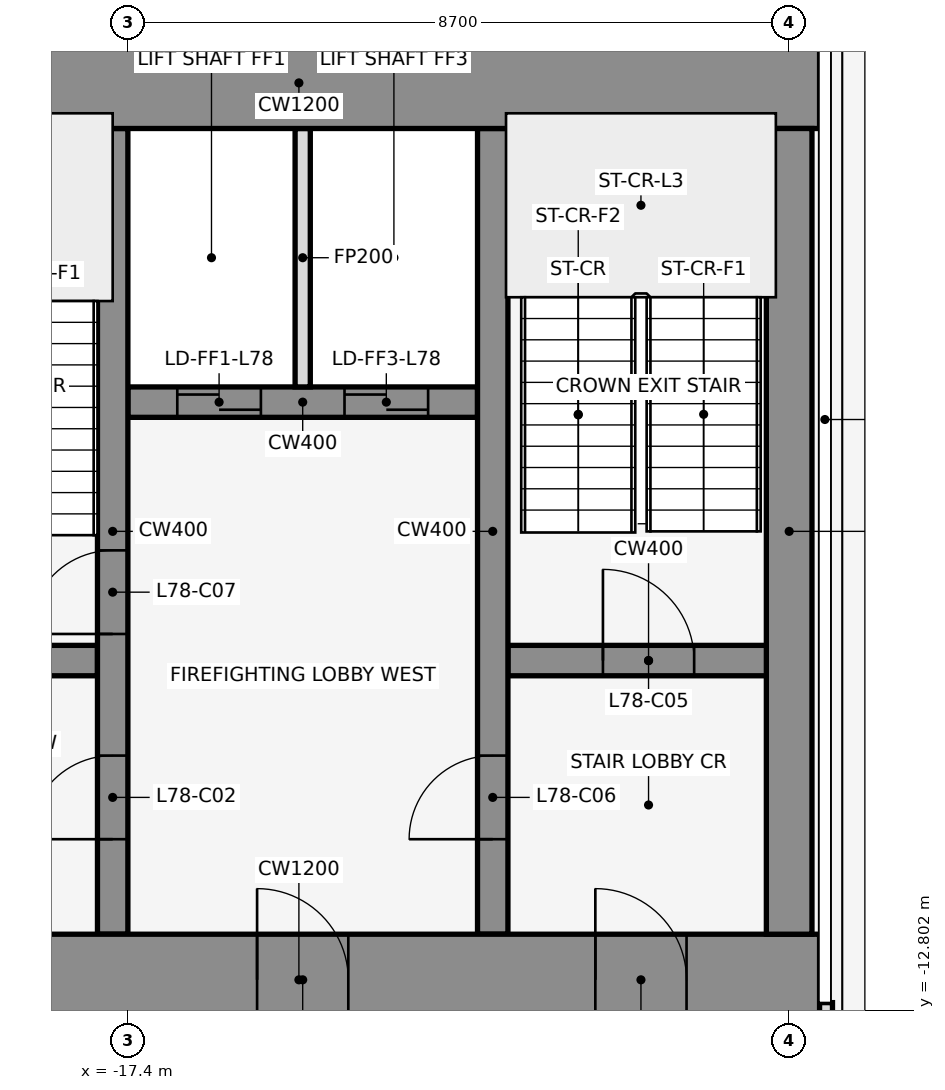
"""IFC4 building model, lengths in metres.
Left out: names, types, materials, properties, quantities, classifications, styles, units other than length and angle.
Written with IfcOpenShell. Run it as: python <this file> out.ifc"""

import sys

from ifc_helpers import new_model, si_unit, direction, frame, frame_2d, origin, place, context, subcontext, project, spatial, rectangle, extrude, element, fill, save


model = new_model("IFC4")
c1 = context("Model", 3, precision=1e-05, world=origin(), true_north=direction((0.0, 1.0)))
c2 = subcontext(c1, "Body", "Model", "MODEL_VIEW")
j1 = project(units=[si_unit("LENGTHUNIT", "METRE"), si_unit("PLANEANGLEUNIT", "RADIAN")], contexts=[c1])
p1 = place(None, origin())
s1 = spatial("IfcSite", under=j1, at=p1, CompositionType="ELEMENT")
p2 = place(p1, origin())
s2 = spatial("IfcBuilding", under=s1, at=p2, CompositionType="ELEMENT")
p3 = place(p2, frame((0.0, 0.0, 347.9)))
s3 = spatial("IfcBuildingStorey", under=s2, at=p3, CompositionType="ELEMENT", Elevation=347.9)
p4 = place(p3, frame((-8.23, -12.7, 0.0), z_axis=(0.0, 0.0, 1.0), x_axis=(0.0, -1.0, 0.0)))
e1 = element("IfcWall", 1, at=p4, inside=s3, PredefinedType="STANDARD", context=c2, shape_type="SweptSolid", body=[
    extrude(rectangle(XDim=3.0, YDim=0.2, at=frame_2d((1.5, 0.0))), origin(), (0.0, 0.0, 1.0), 4.3),
])
p5 = place(p4, frame((0.6, 0.0, 0.0)))
e2 = element("IfcOpeningElement", 2, at=p5, cuts=e1, PredefinedType="OPENING", context=c2, shape_type="SweptSolid", body=[
    extrude(rectangle(XDim=1.8, YDim=2.4, at=frame_2d((0.9, 1.2))), frame((0.0, 0.112, 0.0), z_axis=(0.0, -1.0, 0.0), x_axis=(1.0, 0.0, 0.0)), (0.0, 0.0, 1.0), 0.224),
])
p6 = place(p3, frame((-20.8, -8.2, 0.0), z_axis=(0.0, 0.0, 1.0), x_axis=(1.0, 0.0, 0.0)))
e3 = element("IfcWall", 3, at=p6, inside=s3, PredefinedType="SHEAR", context=c2, shape_type="SweptSolid", body=[
    extrude(rectangle(XDim=3.0, YDim=0.4, at=frame_2d((1.5, 0.0))), origin(), (0.0, 0.0, 1.0), 4.5),
])
p7 = place(p6, frame((0.85, 0.0, 0.0)))
e4 = element("IfcOpeningElement", 4, at=p7, cuts=e3, PredefinedType="OPENING", context=c2, shape_type="SweptSolid", body=[
    extrude(rectangle(XDim=1.2, YDim=2.1, at=frame_2d((0.6, 1.05))), frame((0.0, 0.212, 0.0), z_axis=(0.0, -1.0, 0.0), x_axis=(1.0, 0.0, 0.0)), (0.0, 0.0, 1.0), 0.424),
])
p8 = place(p3, frame((-12.4, -8.2, 0.0), z_axis=(0.0, 0.0, 1.0), x_axis=(1.0, 0.0, 0.0)))
e5 = element("IfcWall", 5, at=p8, inside=s3, PredefinedType="SHEAR", context=c2, shape_type="SweptSolid", body=[
    extrude(rectangle(XDim=3.7, YDim=0.4, at=frame_2d((1.85, 0.0))), origin(), (0.0, 0.0, 1.0), 4.5),
])
p9 = place(p8, frame((1.25, 0.0, 0.0)))
e6 = element("IfcOpeningElement", 6, at=p9, cuts=e5, PredefinedType="OPENING", context=c2, shape_type="SweptSolid", body=[
    extrude(rectangle(XDim=1.2, YDim=2.1, at=frame_2d((0.6, 1.05))), frame((0.0, 0.212, 0.0), z_axis=(0.0, -1.0, 0.0), x_axis=(1.0, 0.0, 0.0)), (0.0, 0.0, 1.0), 0.424),
])
p10 = place(p3, frame((-17.4, -4.8, 0.0), z_axis=(0.0, 0.0, 1.0), x_axis=(1.0, 0.0, 0.0)))
e7 = element("IfcWall", 7, at=p10, inside=s3, PredefinedType="SHEAR", context=c2, shape_type="SweptSolid", body=[
    extrude(rectangle(XDim=4.6, YDim=0.4, at=frame_2d((2.3, 0.0))), origin(), (0.0, 0.0, 1.0), 4.5),
])
p11 = place(p10, frame((0.65, 0.0, 0.0)))
e8 = element("IfcOpeningElement", 8, at=p11, cuts=e7, PredefinedType="OPENING", context=c2, shape_type="SweptSolid", body=[
    extrude(rectangle(XDim=1.1, YDim=2.1, at=frame_2d((0.55, 1.05))), frame((0.0, 0.212, 0.0), z_axis=(0.0, -1.0, 0.0), x_axis=(1.0, 0.0, 0.0)), (0.0, 0.0, 1.0), 0.424),
])
p12 = place(p10, frame((2.85, 0.0, 0.0)))
e9 = element("IfcOpeningElement", 9, at=p12, cuts=e7, PredefinedType="OPENING", context=c2, shape_type="SweptSolid", body=[
    extrude(rectangle(XDim=1.1, YDim=2.1, at=frame_2d((0.55, 1.05))), frame((0.0, 0.212, 0.0), z_axis=(0.0, -1.0, 0.0), x_axis=(1.0, 0.0, 0.0)), (0.0, 0.0, 1.0), 0.424),
])
p13 = place(p3, frame((-17.6, -11.8, 0.0), z_axis=(0.0, 0.0, 1.0), x_axis=(0.0, 1.0, 0.0)))
e10 = element("IfcWall", 10, at=p13, inside=s3, PredefinedType="SHEAR", context=c2, shape_type="SweptSolid", body=[
    extrude(rectangle(XDim=10.6, YDim=0.4, at=frame_2d((5.3, 0.0))), origin(), (0.0, 0.0, 1.0), 4.5),
])
p14 = place(p13, frame((1.25, 0.0, 0.0)))
e11 = element("IfcOpeningElement", 11, at=p14, cuts=e10, PredefinedType="OPENING", context=c2, shape_type="SweptSolid", body=[
    extrude(rectangle(XDim=1.1, YDim=2.1, at=frame_2d((0.55, 1.05))), frame((0.0, 0.212, 0.0), z_axis=(0.0, -1.0, 0.0), x_axis=(1.0, 0.0, 0.0)), (0.0, 0.0, 1.0), 0.424),
])
p15 = place(p13, frame((3.95, 0.0, 0.0)))
e12 = element("IfcOpeningElement", 12, at=p15, cuts=e10, PredefinedType="OPENING", context=c2, shape_type="SweptSolid", body=[
    extrude(rectangle(XDim=1.1, YDim=2.1, at=frame_2d((0.55, 1.05))), frame((0.0, 0.212, 0.0), z_axis=(0.0, -1.0, 0.0), x_axis=(1.0, 0.0, 0.0)), (0.0, 0.0, 1.0), 0.424),
])
p16 = place(p3, frame((-15.1, -4.6, 0.0), z_axis=(0.0, 0.0, 1.0), x_axis=(0.0, 1.0, 0.0)))
e13 = element("IfcWall", 13, at=p16, inside=s3, PredefinedType="PARTITIONING", context=c2, shape_type="SweptSolid", body=[
    extrude(rectangle(XDim=3.4, YDim=0.2, at=frame_2d((1.7, 0.0))), origin(), (0.0, 0.0, 1.0), 3.368),
])
p17 = place(p3, frame((-12.6, -11.8, 0.0), z_axis=(0.0, 0.0, 1.0), x_axis=(0.0, 1.0, 0.0)))
e14 = element("IfcWall", 14, at=p17, inside=s3, PredefinedType="SHEAR", context=c2, shape_type="SweptSolid", body=[
    extrude(rectangle(XDim=10.6, YDim=0.4, at=frame_2d((5.3, 0.0))), origin(), (0.0, 0.0, 1.0), 4.5),
])
p18 = place(p17, frame((1.25, 0.0, 0.0)))
e15 = element("IfcOpeningElement", 15, at=p18, cuts=e14, PredefinedType="OPENING", context=c2, shape_type="SweptSolid", body=[
    extrude(rectangle(XDim=1.1, YDim=2.1, at=frame_2d((0.55, 1.05))), frame((0.0, 0.212, 0.0), z_axis=(0.0, -1.0, 0.0), x_axis=(1.0, 0.0, 0.0)), (0.0, 0.0, 1.0), 0.424),
])
p19 = place(p3, frame((-22.0, -0.6, 0.0), z_axis=(0.0, 0.0, 1.0), x_axis=(1.0, 0.0, 0.0)))
e16 = element("IfcWall", 16, at=p19, inside=s3, PredefinedType="SHEAR", context=c2, shape_type="SweptSolid", body=[
    extrude(rectangle(XDim=13.7, YDim=1.2, at=frame_2d((6.85, 0.0))), origin(), (0.0, 0.0, 1.0), 4.5),
])
p20 = place(p3, frame((-22.0, -12.4, 0.0), z_axis=(0.0, 0.0, 1.0), x_axis=(1.0, 0.0, 0.0)))
e17 = element("IfcWall", 17, at=p20, inside=s3, PredefinedType="SHEAR", context=c2, shape_type="SweptSolid", body=[
    extrude(rectangle(XDim=13.7, YDim=1.2, at=frame_2d((6.85, 0.0))), origin(), (0.0, 0.0, 1.0), 4.5),
])
p21 = place(p20, frame((2.2, 0.0, 0.0)))
e18 = element("IfcOpeningElement", 18, at=p21, cuts=e17, PredefinedType="OPENING", context=c2, shape_type="SweptSolid", body=[
    extrude(rectangle(XDim=1.2, YDim=2.1, at=frame_2d((0.6, 1.05))), frame((0.0, 0.612, 0.0), z_axis=(0.0, -1.0, 0.0), x_axis=(1.0, 0.0, 0.0)), (0.0, 0.0, 1.0), 1.224),
])
p22 = place(p20, frame((10.75, 0.0, 0.0)))
e19 = element("IfcOpeningElement", 19, at=p22, cuts=e17, PredefinedType="OPENING", context=c2, shape_type="SweptSolid", body=[
    extrude(rectangle(XDim=1.2, YDim=2.1, at=frame_2d((0.6, 1.05))), frame((0.0, 0.612, 0.0), z_axis=(0.0, -1.0, 0.0), x_axis=(1.0, 0.0, 0.0)), (0.0, 0.0, 1.0), 1.224),
])
p23 = place(p20, frame((6.3, 0.0, 0.0)))
e20 = element("IfcOpeningElement", 20, at=p23, cuts=e17, PredefinedType="OPENING", context=c2, shape_type="SweptSolid", body=[
    extrude(rectangle(XDim=1.2, YDim=2.1, at=frame_2d((0.6, 1.05))), frame((0.0, 0.612, 0.0), z_axis=(0.0, -1.0, 0.0), x_axis=(1.0, 0.0, 0.0)), (0.0, 0.0, 1.0), 1.224),
])
p24 = place(p3, frame((-8.7, -11.8, 0.0), z_axis=(0.0, 0.0, 1.0), x_axis=(0.0, 1.0, 0.0)))
e21 = element("IfcWall", 21, at=p24, inside=s3, PredefinedType="SHEAR", context=c2, shape_type="SweptSolid", body=[
    extrude(rectangle(XDim=10.6, YDim=0.6, at=frame_2d((5.3, 0.0))), origin(), (0.0, 0.0, 1.0), 4.5),
])
p25 = place(p14, frame((1.1, 0.0, 0.0), z_axis=(0.0, 0.0, 1.0), x_axis=(-1.0, 0.0, 0.0)))
e22 = element("IfcDoor", 22, at=p25, inside=s3, OperationType="SINGLE_SWING_LEFT", PredefinedType="DOOR", context=c2, shape_type="SweptSolid", body=[
    extrude(rectangle(XDim=1.1, YDim=2.1, at=frame_2d((0.55, 1.05))), frame((0.0, 0.025, 0.0), z_axis=(0.0, -1.0, 0.0), x_axis=(1.0, 0.0, 0.0)), (0.0, 0.0, 1.0), 0.05),
])
fill(e11, e22)
p26 = place(p9, origin())
e23 = element("IfcDoor", 23, at=p26, inside=s3, OperationType="SINGLE_SWING_LEFT", PredefinedType="DOOR", context=c2, shape_type="SweptSolid", body=[
    extrude(rectangle(XDim=1.2, YDim=2.1, at=frame_2d((0.6, 1.05))), frame((0.0, 0.025, 0.0), z_axis=(0.0, -1.0, 0.0), x_axis=(1.0, 0.0, 0.0)), (0.0, 0.0, 1.0), 0.05),
])
fill(e6, e23)
p27 = place(p18, origin())
e24 = element("IfcDoor", 24, at=p27, inside=s3, OperationType="SINGLE_SWING_RIGHT", PredefinedType="DOOR", context=c2, shape_type="SweptSolid", body=[
    extrude(rectangle(XDim=1.1, YDim=2.1, at=frame_2d((0.55, 1.05))), frame((0.0, 0.025, 0.0), z_axis=(0.0, -1.0, 0.0), x_axis=(1.0, 0.0, 0.0)), (0.0, 0.0, 1.0), 0.05),
])
fill(e15, e24)
p28 = place(p11, origin())
e25 = element("IfcDoor", 25, at=p28, inside=s3, OperationType="DOUBLE_DOOR_SLIDING", PredefinedType="DOOR", context=c2, shape_type="SweptSolid", body=[
    extrude(rectangle(XDim=1.1, YDim=2.1, at=frame_2d((0.55, 1.05))), frame((0.0, 0.025, 0.0), z_axis=(0.0, -1.0, 0.0), x_axis=(1.0, 0.0, 0.0)), (0.0, 0.0, 1.0), 0.05),
])
fill(e8, e25)
p29 = place(p12, origin())
e26 = element("IfcDoor", 26, at=p29, inside=s3, OperationType="DOUBLE_DOOR_SLIDING", PredefinedType="DOOR", context=c2, shape_type="SweptSolid", body=[
    extrude(rectangle(XDim=1.1, YDim=2.1, at=frame_2d((0.55, 1.05))), frame((0.0, 0.025, 0.0), z_axis=(0.0, -1.0, 0.0), x_axis=(1.0, 0.0, 0.0)), (0.0, 0.0, 1.0), 0.05),
])
fill(e9, e26)
p30 = place(p15, frame((1.1, 0.0, 0.0), z_axis=(0.0, 0.0, 1.0), x_axis=(-1.0, 0.0, 0.0)))
e27 = element("IfcDoor", 27, at=p30, inside=s3, OperationType="SINGLE_SWING_RIGHT", PredefinedType="DOOR", context=c2, shape_type="SweptSolid", body=[
    extrude(rectangle(XDim=1.1, YDim=2.1, at=frame_2d((0.55, 1.05))), frame((0.0, 0.025, 0.0), z_axis=(0.0, -1.0, 0.0), x_axis=(1.0, 0.0, 0.0)), (0.0, 0.0, 1.0), 0.05),
])
fill(e12, e27)
p31 = place(p22, frame((1.2, 0.0, 0.0), z_axis=(0.0, 0.0, 1.0), x_axis=(-1.0, 0.0, 0.0)))
e28 = element("IfcDoor", 28, at=p31, inside=s3, OperationType="SINGLE_SWING_RIGHT", PredefinedType="DOOR", context=c2, shape_type="SweptSolid", body=[
    extrude(rectangle(XDim=1.2, YDim=2.1, at=frame_2d((0.6, 1.05))), frame((0.0, 0.025, 0.0), z_axis=(0.0, -1.0, 0.0), x_axis=(1.0, 0.0, 0.0)), (0.0, 0.0, 1.0), 0.05),
])
fill(e19, e28)
p32 = place(p23, frame((1.2, 0.0, 0.0), z_axis=(0.0, 0.0, 1.0), x_axis=(-1.0, 0.0, 0.0)))
e29 = element("IfcDoor", 29, at=p32, inside=s3, OperationType="SINGLE_SWING_RIGHT", PredefinedType="DOOR", context=c2, shape_type="SweptSolid", body=[
    extrude(rectangle(XDim=1.2, YDim=2.1, at=frame_2d((0.6, 1.05))), frame((0.0, 0.025, 0.0), z_axis=(0.0, -1.0, 0.0), x_axis=(1.0, 0.0, 0.0)), (0.0, 0.0, 1.0), 0.05),
])
fill(e20, e29)
save(model, sys.argv[1])
